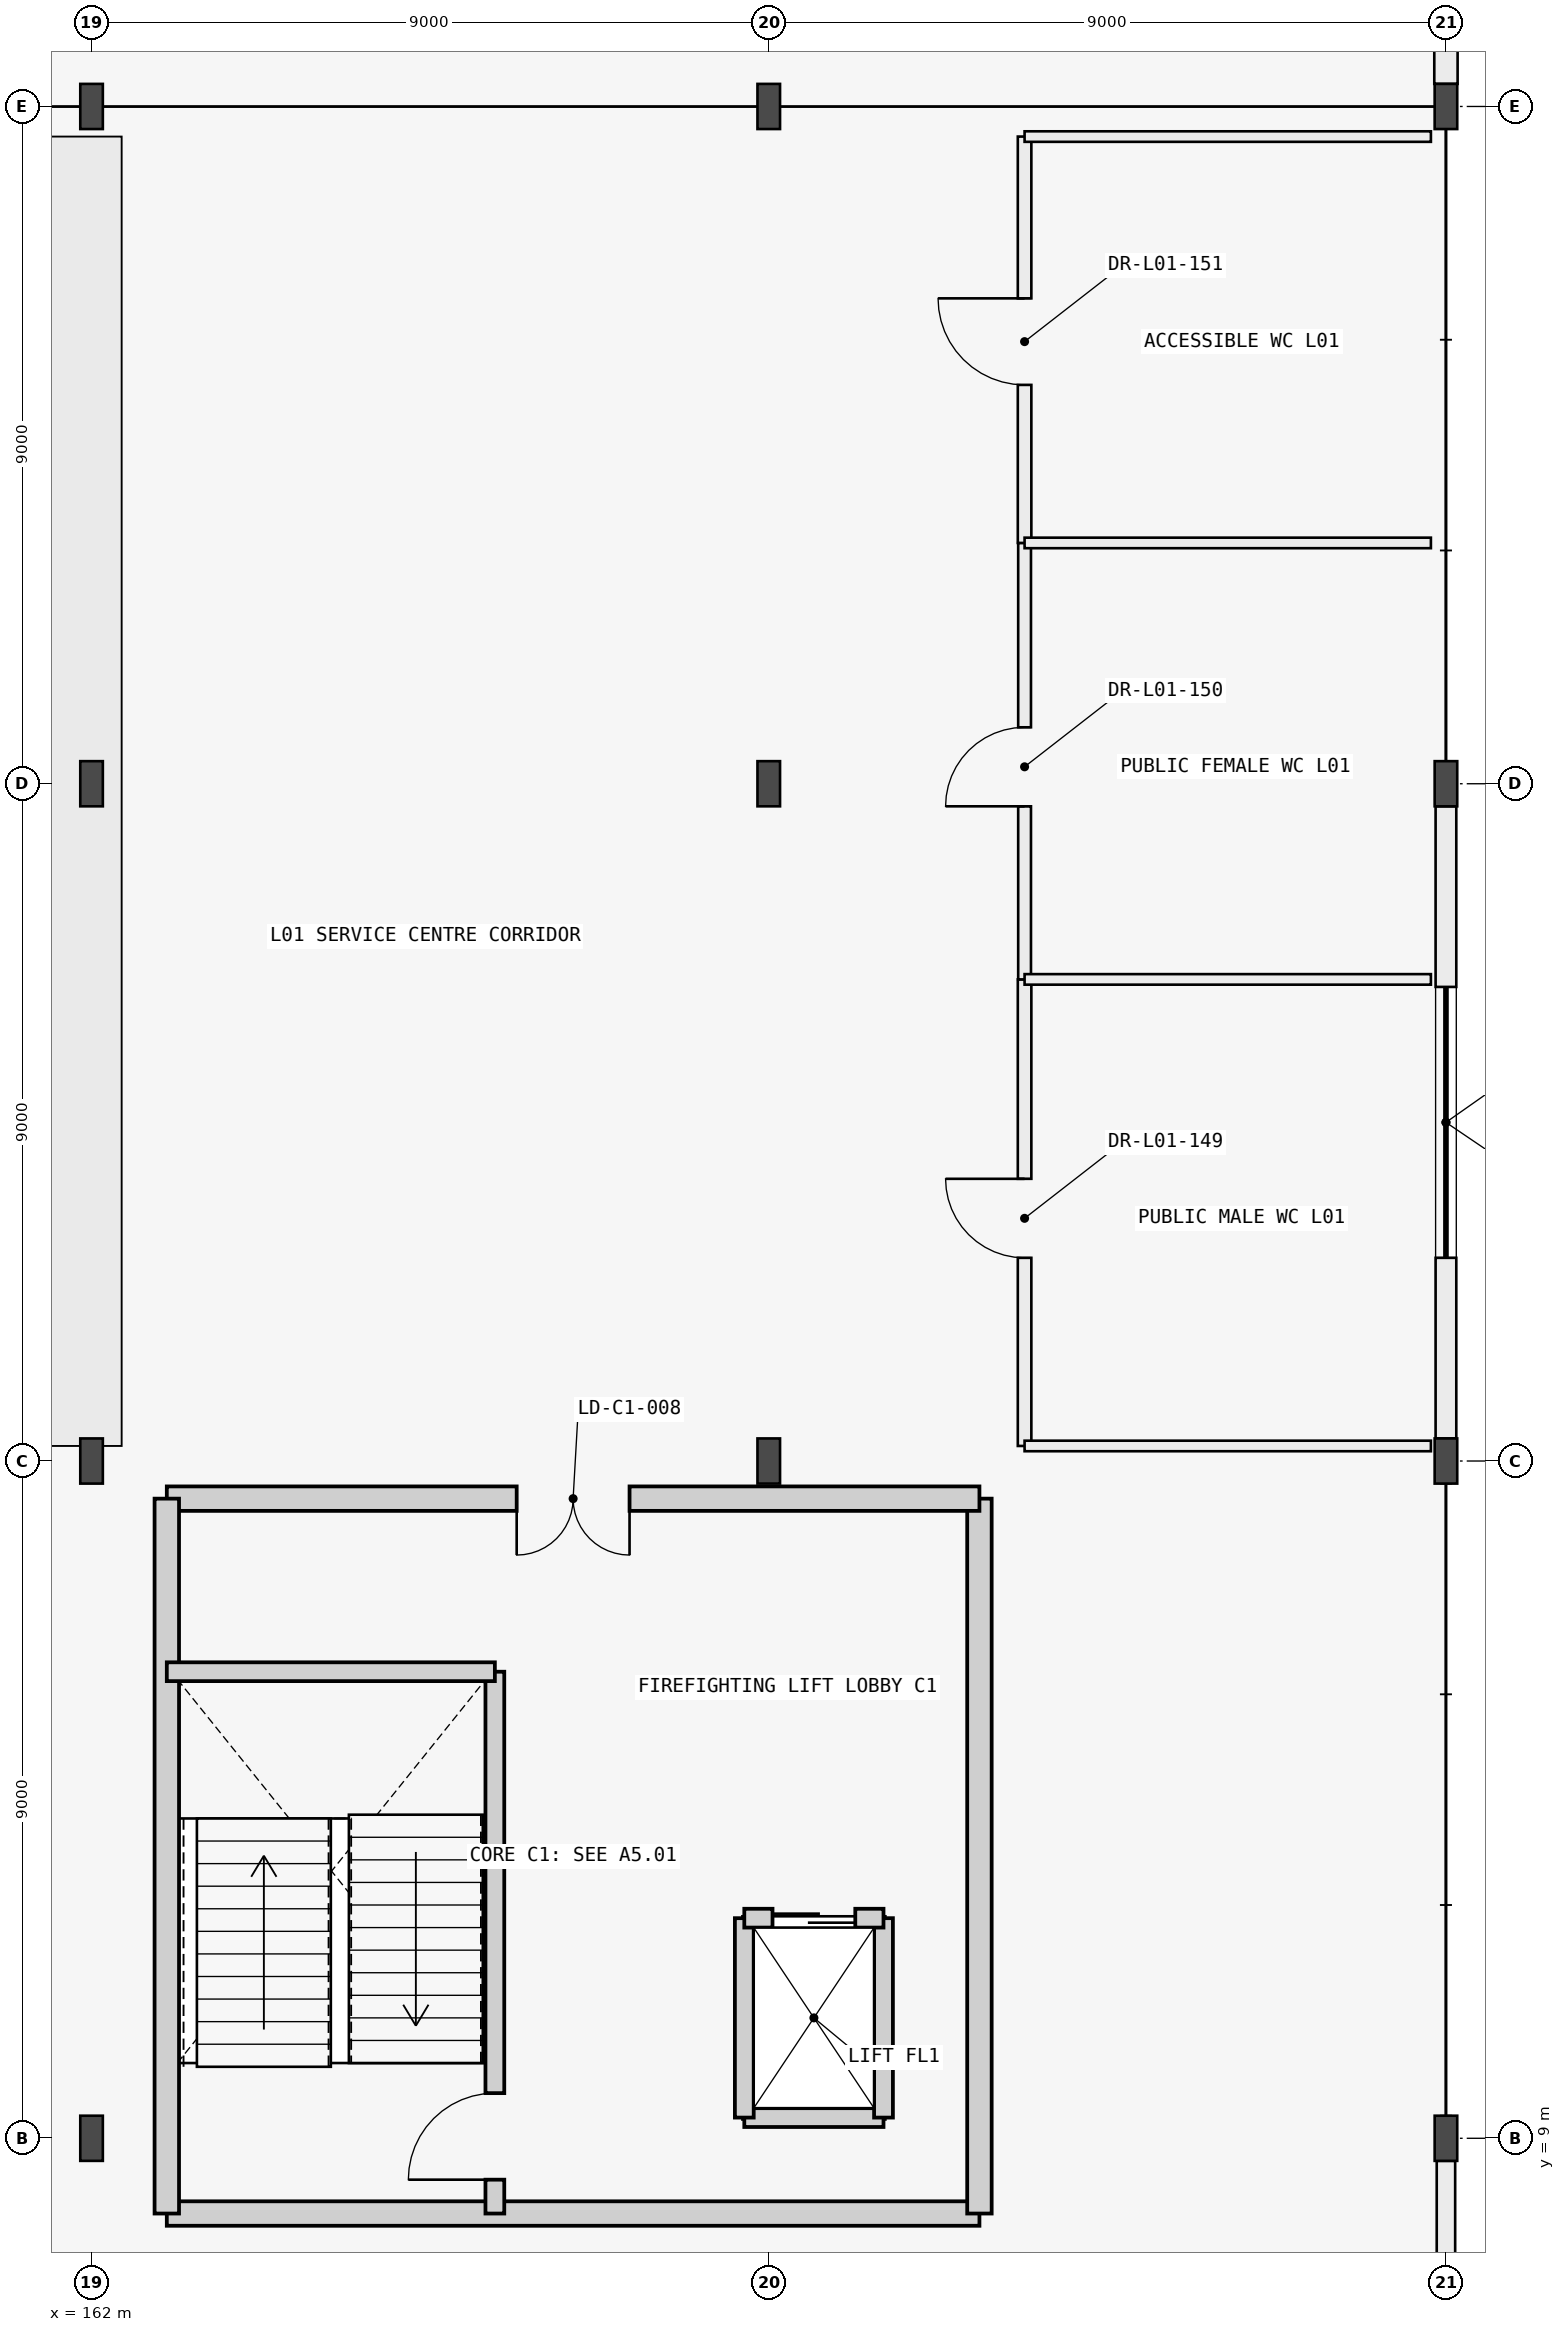
"""IFC4 building model, lengths in metres.
Left out: names, types, materials, properties, quantities, classifications, styles, units other than length and angle.
Written with IfcOpenShell. Run it as: python <this file> out.ifc"""

import sys

from ifc_helpers import new_model, si_unit, direction, frame, frame_2d, origin, origin_2d, place, context, subcontext, project, spatial, rectangle, i_section, extrude, element, fill, save


model = new_model("IFC4")
c1 = context("Model", 3, precision=1e-05, world=origin(), true_north=direction((0.0, 1.0)))
c2 = subcontext(c1, "Body", "Model", "MODEL_VIEW")
j1 = project(units=[si_unit("LENGTHUNIT", "METRE"), si_unit("PLANEANGLEUNIT", "RADIAN")], contexts=[c1])
p1 = place(None, origin())
s1 = spatial("IfcSite", under=j1, at=p1, CompositionType="ELEMENT")
p2 = place(p1, origin())
s2 = spatial("IfcBuilding", under=s1, at=p2, CompositionType="ELEMENT")
p3 = place(p2, frame((0.0, 0.0, 4.2)))
s3 = spatial("IfcBuildingStorey", under=s2, at=p3, CompositionType="ELEMENT", Elevation=4.2)
for number, where, z_axis, x_axis in (
    (1, (162.0, 9.0, 0.0), (0.0, 0.0, 1.0), (1.0, 0.0, 0.0)),
    (2, (180.0, 9.0, 0.0), (0.0, 0.0, 1.0), (1.0, 0.0, 0.0)),
    (3, (162.0, 18.0, 0.0), (0.0, 0.0, 1.0), (1.0, 0.0, 0.0)),
    (4, (171.0, 18.0, 0.0), (0.0, 0.0, 1.0), (1.0, 0.0, 0.0)),
    (5, (180.0, 18.0, 0.0), (0.0, 0.0, 1.0), (1.0, 0.0, 0.0)),
    (6, (162.0, 27.0, 0.0), (0.0, 0.0, 1.0), (1.0, 0.0, 0.0)),
    (7, (171.0, 27.0, 0.0), (0.0, 0.0, 1.0), (1.0, 0.0, 0.0)),
    (8, (180.0, 27.0, 0.0), (0.0, 0.0, 1.0), (1.0, 0.0, 0.0)),
    (9, (162.0, 36.0, 0.0), (0.0, 0.0, 1.0), (1.0, 0.0, 0.0)),
    (10, (171.0, 36.0, 0.0), (0.0, 0.0, 1.0), (1.0, 0.0, 0.0)),
    (11, (180.0, 36.0, 0.0), (0.0, 0.0, 1.0), (1.0, 0.0, 0.0)),
):
    element("IfcColumn", number, at=place(p3, frame(where, z_axis=z_axis, x_axis=x_axis)), inside=s3, PredefinedType="COLUMN", context=c2, shape_type="SweptSolid", body=[
        extrude(i_section(OverallWidth=0.3, OverallDepth=0.6, WebThickness=0.015, FlangeThickness=0.03, FilletRadius=0.027, at=origin_2d()), origin(), (0.0, 0.0, 1.0), 4.2),
    ])
p4 = place(p3, frame((180.0, 0.3, 0.0), z_axis=(0.0, 0.0, 1.0), x_axis=(0.0, 1.0, 0.0)))
e12 = element("IfcWall", 12, at=p4, inside=s3, PredefinedType="STANDARD", context=c2, shape_type="SweptSolid", body=[
    extrude(rectangle(XDim=8.4, YDim=0.245, at=frame_2d((4.2, 0.0))), origin(), (0.0, 0.0, 1.0), 3.62),
])
p5 = place(p4, frame((2.6, 0.0, 0.95)))
e13 = element("IfcOpeningElement", 13, at=p5, cuts=e12, PredefinedType="OPENING", context=c2, shape_type="SweptSolid", body=[
    extrude(rectangle(XDim=3.2, YDim=1.45, at=frame_2d((1.6, 0.725))), frame((0.0, 0.133, 0.0), z_axis=(0.0, -1.0, 0.0), x_axis=(1.0, 0.0, 0.0)), (0.0, 0.0, 1.0), 0.265),
])
p6 = place(p3, frame((180.0, 18.3, 0.0), z_axis=(0.0, 0.0, 1.0), x_axis=(0.0, 1.0, 0.0)))
e14 = element("IfcWall", 14, at=p6, inside=s3, PredefinedType="POLYGONAL", context=c2, shape_type="SweptSolid", body=[
    extrude(rectangle(XDim=8.4, YDim=0.275, at=frame_2d((4.2, 0.0))), origin(), (0.0, 0.0, 1.0), 3.62),
])
p7 = place(p6, frame((2.4, 0.0, 0.95)))
e15 = element("IfcOpeningElement", 15, at=p7, cuts=e14, PredefinedType="OPENING", context=c2, shape_type="SweptSolid", body=[
    extrude(rectangle(XDim=3.6, YDim=1.65, at=frame_2d((1.8, 0.825))), frame((0.0, 0.147, 0.0), z_axis=(0.0, -1.0, 0.0), x_axis=(1.0, 0.0, 0.0)), (0.0, 0.0, 1.0), 0.295),
])
p8 = place(p3, frame((180.0, 36.3, 0.0), z_axis=(0.0, 0.0, 1.0), x_axis=(0.0, 1.0, 0.0)))
e16 = element("IfcWall", 16, at=p8, inside=s3, PredefinedType="STANDARD", context=c2, shape_type="SweptSolid", body=[
    extrude(rectangle(XDim=8.4, YDim=0.31, at=frame_2d((4.2, 0.0))), origin(), (0.0, 0.0, 1.0), 3.62),
])
p9 = place(p8, frame((2.2, 0.0, 0.95)))
e17 = element("IfcOpeningElement", 17, at=p9, cuts=e16, PredefinedType="OPENING", context=c2, shape_type="SweptSolid", body=[
    extrude(rectangle(XDim=4.0, YDim=1.5, at=frame_2d((2.0, 0.75))), frame((0.0, 0.165, 0.0), z_axis=(0.0, -1.0, 0.0), x_axis=(1.0, 0.0, 0.0)), (0.0, 0.0, 1.0), 0.33),
])
p10 = place(p3, frame((163.0, 8.0, 0.0), z_axis=(0.0, 0.0, 1.0), x_axis=(1.0, 0.0, 0.0)))
e18 = element("IfcWall", 18, at=p10, inside=s3, PredefinedType="SHEAR", context=c2, shape_type="SweptSolid", body=[
    extrude(rectangle(XDim=10.8, YDim=0.325, at=frame_2d((5.4, 0.0))), origin(), (0.0, 0.0, 1.0), 3.945),
])
p11 = place(p3, frame((173.8, 8.0, 0.0), z_axis=(0.0, 0.0, 1.0), x_axis=(0.0, 1.0, 0.0)))
e19 = element("IfcWall", 19, at=p11, inside=s3, PredefinedType="SHEAR", context=c2, shape_type="SweptSolid", body=[
    extrude(rectangle(XDim=9.5, YDim=0.325, at=frame_2d((4.75, 0.0))), origin(), (0.0, 0.0, 1.0), 3.945),
])
p12 = place(p3, frame((173.8, 17.5, 0.0), z_axis=(0.0, 0.0, 1.0), x_axis=(-1.0, 0.0, 0.0)))
e20 = element("IfcWall", 20, at=p12, inside=s3, PredefinedType="SHEAR", context=c2, shape_type="SweptSolid", body=[
    extrude(rectangle(XDim=10.8, YDim=0.325, at=frame_2d((5.4, 0.0))), origin(), (0.0, 0.0, 1.0), 3.945),
])
p13 = place(p12, frame((4.65, 0.0, 0.0)))
e21 = element("IfcOpeningElement", 21, at=p13, cuts=e20, PredefinedType="OPENING", context=c2, shape_type="SweptSolid", body=[
    extrude(rectangle(XDim=1.5, YDim=2.2, at=frame_2d((0.75, 1.1))), frame((0.0, 0.172, 0.0), z_axis=(0.0, -1.0, 0.0), x_axis=(1.0, 0.0, 0.0)), (0.0, 0.0, 1.0), 0.345),
])
p14 = place(p3, frame((163.0, 17.5, 0.0), z_axis=(0.0, 0.0, 1.0), x_axis=(0.0, -1.0, 0.0)))
e22 = element("IfcWall", 22, at=p14, inside=s3, PredefinedType="SHEAR", context=c2, shape_type="SweptSolid", body=[
    extrude(rectangle(XDim=9.5, YDim=0.325, at=frame_2d((4.75, 0.0))), origin(), (0.0, 0.0, 1.0), 3.945),
])
p15 = place(p3, frame((167.36, 8.0, 0.0), z_axis=(0.0, 0.0, 1.0), x_axis=(0.0, 1.0, 0.0)))
e23 = element("IfcWall", 23, at=p15, inside=s3, PredefinedType="SHEAR", context=c2, shape_type="SweptSolid", body=[
    extrude(rectangle(XDim=7.2, YDim=0.25, at=frame_2d((3.6, 0.0))), origin(), (0.0, 0.0, 1.0), 3.945),
])
p16 = place(p15, frame((0.45, 0.0, 0.0)))
e24 = element("IfcOpeningElement", 24, at=p16, cuts=e23, PredefinedType="OPENING", context=c2, shape_type="SweptSolid", body=[
    extrude(rectangle(XDim=1.15, YDim=2.15, at=frame_2d((0.575, 1.075))), frame((0.0, 0.135, 0.0), z_axis=(0.0, -1.0, 0.0), x_axis=(1.0, 0.0, 0.0)), (0.0, 0.0, 1.0), 0.27),
])
p17 = place(p3, frame((163.0, 15.2, 0.0), z_axis=(0.0, 0.0, 1.0), x_axis=(1.0, 0.0, 0.0)))
e25 = element("IfcWall", 25, at=p17, inside=s3, PredefinedType="SHEAR", context=c2, shape_type="SweptSolid", body=[
    extrude(rectangle(XDim=4.36, YDim=0.25, at=frame_2d((2.18, 0.0))), origin(), (0.0, 0.0, 1.0), 3.945),
])
p18 = place(p3, frame((170.675, 9.275, 0.0), z_axis=(0.0, 0.0, 1.0), x_axis=(1.0, 0.0, 0.0)))
e26 = element("IfcWall", 26, at=p18, inside=s3, PredefinedType="SHEAR", context=c2, shape_type="SweptSolid", body=[
    extrude(rectangle(XDim=1.85, YDim=0.25, at=frame_2d((0.925, 0.0))), origin(), (0.0, 0.0, 1.0), 3.945),
])
for number, where, z_axis, x_axis in (
    (27, (170.675, 9.275, 0.0), (0.0, 0.0, 1.0), (0.0, 1.0, 0.0)),
    (28, (172.525, 9.275, 0.0), (0.0, 0.0, 1.0), (0.0, 1.0, 0.0)),
):
    element("IfcWall", number, at=place(p3, frame(where, z_axis=z_axis, x_axis=x_axis)), inside=s3, PredefinedType="SHEAR", context=c2, shape_type="SweptSolid", body=[
        extrude(rectangle(XDim=2.65, YDim=0.25, at=frame_2d((1.325, 0.0))), origin(), (0.0, 0.0, 1.0), 3.945),
    ])
p19 = place(p3, frame((170.675, 11.925, 0.0), z_axis=(0.0, 0.0, 1.0), x_axis=(1.0, 0.0, 0.0)))
e29 = element("IfcWall", 29, at=p19, inside=s3, PredefinedType="SHEAR", context=c2, shape_type="SweptSolid", body=[
    extrude(rectangle(XDim=1.85, YDim=0.25, at=frame_2d((0.925, 0.0))), origin(), (0.0, 0.0, 1.0), 3.945),
])
p20 = place(p19, frame((0.375, 0.0, 0.0)))
e30 = element("IfcOpeningElement", 30, at=p20, cuts=e29, PredefinedType="OPENING", context=c2, shape_type="SweptSolid", body=[
    extrude(rectangle(XDim=1.1, YDim=2.15, at=frame_2d((0.55, 1.075))), frame((0.0, 0.135, 0.0), z_axis=(0.0, -1.0, 0.0), x_axis=(1.0, 0.0, 0.0)), (0.0, 0.0, 1.0), 0.27),
])
p21 = place(p3, frame((174.4, 18.2, 0.0), z_axis=(0.0, 0.0, 1.0), x_axis=(0.0, 1.0, 0.0)))
e31 = element("IfcWall", 31, at=p21, inside=s3, PredefinedType="PARTITIONING", context=c2, shape_type="SweptSolid", body=[
    extrude(rectangle(XDim=6.2, YDim=0.18, at=frame_2d((3.1, 0.0))), origin(), (0.0, 0.0, 1.0), 3.62),
])
p22 = place(p21, frame((2.5, 0.0, 0.0)))
e32 = element("IfcOpeningElement", 32, at=p22, cuts=e31, PredefinedType="OPENING", context=c2, shape_type="SweptSolid", body=[
    extrude(rectangle(XDim=1.05, YDim=2.1, at=frame_2d((0.525, 1.05))), frame((0.0, 0.1, 0.0), z_axis=(0.0, -1.0, 0.0), x_axis=(1.0, 0.0, 0.0)), (0.0, 0.0, 1.0), 0.2),
])
p23 = place(p3, frame((174.4, 24.4, 0.0), z_axis=(0.0, 0.0, 1.0), x_axis=(0.0, 1.0, 0.0)))
e33 = element("IfcWall", 33, at=p23, inside=s3, PredefinedType="PARTITIONING", context=c2, shape_type="SweptSolid", body=[
    extrude(rectangle(XDim=5.8, YDim=0.17, at=frame_2d((2.9, 0.0))), origin(), (0.0, 0.0, 1.0), 3.62),
])
p24 = place(p23, frame((2.3, 0.0, 0.0)))
e34 = element("IfcOpeningElement", 34, at=p24, cuts=e33, PredefinedType="OPENING", context=c2, shape_type="SweptSolid", body=[
    extrude(rectangle(XDim=1.05, YDim=2.1, at=frame_2d((0.525, 1.05))), frame((0.0, 0.095, 0.0), z_axis=(0.0, -1.0, 0.0), x_axis=(1.0, 0.0, 0.0)), (0.0, 0.0, 1.0), 0.19),
])
p25 = place(p3, frame((174.4, 30.2, 0.0), z_axis=(0.0, 0.0, 1.0), x_axis=(0.0, 1.0, 0.0)))
e35 = element("IfcWall", 35, at=p25, inside=s3, PredefinedType="PARTITIONING", context=c2, shape_type="SweptSolid", body=[
    extrude(rectangle(XDim=5.4, YDim=0.18, at=frame_2d((2.7, 0.0))), origin(), (0.0, 0.0, 1.0), 3.62),
])
p26 = place(p25, frame((2.1, 0.0, 0.0)))
e36 = element("IfcOpeningElement", 36, at=p26, cuts=e35, PredefinedType="OPENING", context=c2, shape_type="SweptSolid", body=[
    extrude(rectangle(XDim=1.15, YDim=2.15, at=frame_2d((0.575, 1.075))), frame((0.0, 0.1, 0.0), z_axis=(0.0, -1.0, 0.0), x_axis=(1.0, 0.0, 0.0)), (0.0, 0.0, 1.0), 0.2),
])
p27 = place(p3, frame((174.4, 18.2, 0.0), z_axis=(0.0, 0.0, 1.0), x_axis=(1.0, 0.0, 0.0)))
e37 = element("IfcWall", 37, at=p27, inside=s3, PredefinedType="PARTITIONING", context=c2, shape_type="SweptSolid", body=[
    extrude(rectangle(XDim=5.4, YDim=0.14, at=frame_2d((2.7, 0.0))), origin(), (0.0, 0.0, 1.0), 3.42),
])
for number, where, z_axis, x_axis in (
    (38, (174.4, 24.4, 0.0), (0.0, 0.0, 1.0), (1.0, 0.0, 0.0)),
    (39, (174.4, 30.2, 0.0), (0.0, 0.0, 1.0), (1.0, 0.0, 0.0)),
):
    element("IfcWall", number, at=place(p3, frame(where, z_axis=z_axis, x_axis=x_axis)), inside=s3, PredefinedType="PARTITIONING", context=c2, shape_type="SweptSolid", body=[
        extrude(rectangle(XDim=5.4, YDim=0.14, at=frame_2d((2.7, 0.0))), origin(), (0.0, 0.0, 1.0), 3.945),
    ])
p28 = place(p3, frame((174.4, 35.6, 0.0), z_axis=(0.0, 0.0, 1.0), x_axis=(1.0, 0.0, 0.0)))
e40 = element("IfcWall", 40, at=p28, inside=s3, PredefinedType="PARTITIONING", context=c2, shape_type="SweptSolid", body=[
    extrude(rectangle(XDim=5.4, YDim=0.14, at=frame_2d((2.7, 0.0))), origin(), (0.0, 0.0, 1.0), 3.42),
])
p29 = place(p7, origin())
e41 = element("IfcWindow", 41, at=p29, inside=s3, PartitioningType="SINGLE_PANEL", PredefinedType="WINDOW", context=c2, shape_type="SweptSolid", body=[
    extrude(rectangle(XDim=3.6, YDim=1.65, at=frame_2d((1.8, 0.825))), frame((0.0, 0.03, 0.0), z_axis=(0.0, -1.0, 0.0), x_axis=(1.0, 0.0, 0.0)), (0.0, 0.0, 1.0), 0.06),
])
fill(e15, e41)
p30 = place(p16, origin())
e42 = element("IfcDoor", 42, at=p30, inside=s3, OperationType="SINGLE_SWING_LEFT", PredefinedType="DOOR", context=c2, shape_type="SweptSolid", body=[
    extrude(rectangle(XDim=1.15, YDim=2.15, at=frame_2d((0.575, 1.075))), frame((0.0, 0.025, 0.0), z_axis=(0.0, -1.0, 0.0), x_axis=(1.0, 0.0, 0.0)), (0.0, 0.0, 1.0), 0.05),
])
fill(e24, e42)
p31 = place(p13, origin())
e43 = element("IfcDoor", 43, at=p31, inside=s3, OperationType="DOUBLE_DOOR_SINGLE_SWING", PredefinedType="DOOR", context=c2, shape_type="SweptSolid", body=[
    extrude(rectangle(XDim=1.5, YDim=2.2, at=frame_2d((0.75, 1.1))), frame((0.0, 0.025, 0.0), z_axis=(0.0, -1.0, 0.0), x_axis=(1.0, 0.0, 0.0)), (0.0, 0.0, 1.0), 0.05),
])
fill(e21, e43)
p32 = place(p20, origin())
e44 = element("IfcDoor", 44, at=p32, inside=s3, OperationType="DOUBLE_DOOR_SLIDING", PredefinedType="USERDEFINED", context=c2, shape_type="SweptSolid", body=[
    extrude(rectangle(XDim=1.1, YDim=2.15, at=frame_2d((0.55, 1.075))), frame((0.0, 0.025, 0.0), z_axis=(0.0, -1.0, 0.0), x_axis=(1.0, 0.0, 0.0)), (0.0, 0.0, 1.0), 0.05),
])
fill(e30, e44)
p33 = place(p22, origin())
e45 = element("IfcDoor", 45, at=p33, inside=s3, OperationType="SINGLE_SWING_RIGHT", PredefinedType="DOOR", context=c2, shape_type="SweptSolid", body=[
    extrude(rectangle(XDim=1.05, YDim=2.1, at=frame_2d((0.525, 1.05))), frame((0.0, 0.025, 0.0), z_axis=(0.0, -1.0, 0.0), x_axis=(1.0, 0.0, 0.0)), (0.0, 0.0, 1.0), 0.05),
])
fill(e32, e45)
p34 = place(p24, origin())
e46 = element("IfcDoor", 46, at=p34, inside=s3, OperationType="SINGLE_SWING_LEFT", PredefinedType="DOOR", context=c2, shape_type="SweptSolid", body=[
    extrude(rectangle(XDim=1.05, YDim=2.1, at=frame_2d((0.525, 1.05))), frame((0.0, 0.025, 0.0), z_axis=(0.0, -1.0, 0.0), x_axis=(1.0, 0.0, 0.0)), (0.0, 0.0, 1.0), 0.05),
])
fill(e34, e46)
p35 = place(p26, origin())
e47 = element("IfcDoor", 47, at=p35, inside=s3, OperationType="SINGLE_SWING_RIGHT", PredefinedType="DOOR", context=c2, shape_type="SweptSolid", body=[
    extrude(rectangle(XDim=1.15, YDim=2.15, at=frame_2d((0.575, 1.075))), frame((0.0, 0.025, 0.0), z_axis=(0.0, -1.0, 0.0), x_axis=(1.0, 0.0, 0.0)), (0.0, 0.0, 1.0), 0.05),
])
fill(e36, e47)
save(model, sys.argv[1])
